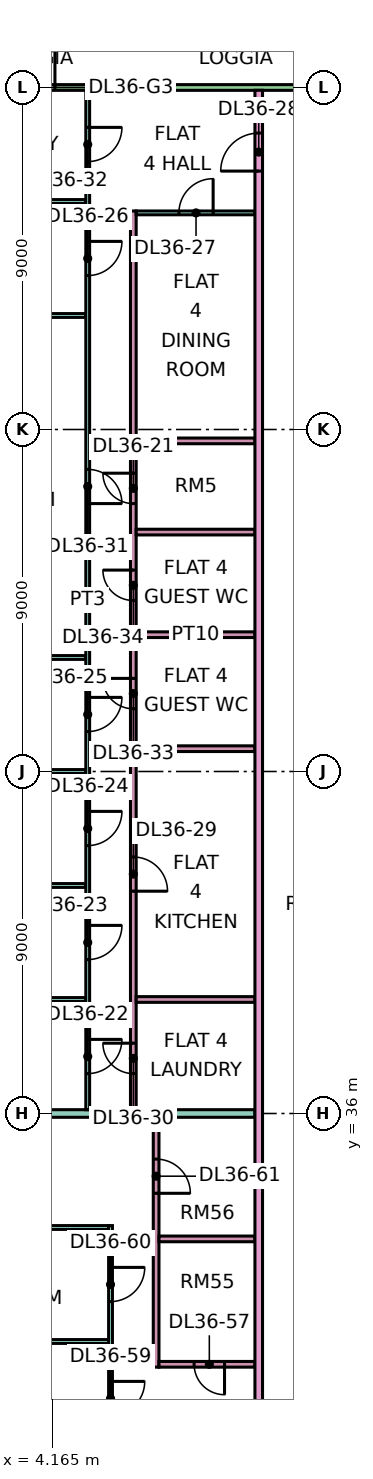
"""IFC4 building model, lengths in metres.
Left out: names, types, materials, properties, quantities, classifications, styles, units other than length and angle.
Written with IfcOpenShell. Run it as: python <this file> out.ifc"""

import sys

from ifc_helpers import new_model, si_unit, direction, frame, frame_2d, origin, place, context, subcontext, project, spatial, rectangle, extrude, element, fill, save


model = new_model("IFC4")
c1 = context("Model", 3, precision=1e-05, world=origin(), true_north=direction((0.0, 1.0)))
c2 = subcontext(c1, "Body", "Model", "MODEL_VIEW")
j1 = project(units=[si_unit("LENGTHUNIT", "METRE"), si_unit("PLANEANGLEUNIT", "RADIAN")], contexts=[c1])
p1 = place(None, origin())
s1 = spatial("IfcSite", under=j1, at=p1, CompositionType="ELEMENT")
p2 = place(p1, origin())
s2 = spatial("IfcBuilding", under=s1, at=p2, CompositionType="ELEMENT")
p3 = place(p2, frame((0.0, 0.0, 161.15)))
s3 = spatial("IfcBuildingStorey", under=s2, at=p3, CompositionType="ELEMENT", Elevation=161.15)
p4 = place(p3, frame((11.925, 63.0, 0.0), z_axis=(0.0, 0.0, 1.0), x_axis=(-1.0, 0.0, 0.0)))
e1 = element("IfcWall", 1, at=p4, inside=s3, PredefinedType="SOLIDWALL", context=c2, shape_type="SweptSolid", body=[
    extrude(rectangle(XDim=10.35, YDim=0.15, at=frame_2d((5.175, 0.0))), origin(), (0.0, 0.0, 1.0), 3.35),
])
p5 = place(p4, frame((7.688, 0.0, 0.0)))
e2 = element("IfcOpeningElement", 2, at=p5, cuts=e1, PredefinedType="OPENING", context=c2, shape_type="SweptSolid", body=[
    extrude(rectangle(XDim=1.8, YDim=2.4, at=frame_2d((0.9, 1.2))), frame((0.0, 0.085, 0.0), z_axis=(0.0, -1.0, 0.0), x_axis=(1.0, 0.0, 0.0)), (0.0, 0.0, 1.0), 0.17),
])
for number, where, z_axis, x_axis in (
    (3, (-1.351, 39.0, 0.0), (0.0, 0.0, 1.0), (1.0, 0.0, 0.0)),
    (4, (-1.351, 42.0, 0.0), (0.0, 0.0, 1.0), (1.0, 0.0, 0.0)),
    (5, (-1.351, 45.0, 0.0), (0.0, 0.0, 1.0), (1.0, 0.0, 0.0)),
):
    element("IfcWall", number, at=place(p3, frame(where, z_axis=z_axis, x_axis=x_axis)), inside=s3, PredefinedType="PARTITIONING", context=c2, shape_type="SweptSolid", body=[
        extrude(rectangle(XDim=6.401, YDim=0.1, at=frame_2d((3.201, 0.0))), origin(), (0.0, 0.0, 1.0), 3.35),
    ])
p6 = place(p3, frame((0.0, 36.0, 0.0), z_axis=(0.0, 0.0, 1.0), x_axis=(1.0, 0.0, 0.0)))
e6 = element("IfcWall", 6, at=p6, inside=s3, PredefinedType="PARTITIONING", context=c2, shape_type="SweptSolid", body=[
    extrude(rectangle(XDim=9.5, YDim=0.2, at=frame_2d((4.75, 0.0))), origin(), (0.0, 0.0, 1.0), 3.35),
])
p7 = place(p3, frame((0.0, 48.0, 0.0), z_axis=(0.0, 0.0, 1.0), x_axis=(1.0, 0.0, 0.0)))
e7 = element("IfcWall", 7, at=p7, inside=s3, PredefinedType="PARTITIONING", context=c2, shape_type="SweptSolid", body=[
    extrude(rectangle(XDim=5.05, YDim=0.1, at=frame_2d((2.525, 0.0))), origin(), (0.0, 0.0, 1.0), 3.35),
])
for number, where, z_axis, x_axis in (
    (8, (0.074, 30.0, 0.0), (0.0, 0.0, 1.0), (1.0, 0.0, 0.0)),
    (9, (0.074, 33.0, 0.0), (0.0, 0.0, 1.0), (1.0, 0.0, 0.0)),
):
    element("IfcWall", number, at=place(p3, frame(where, z_axis=z_axis, x_axis=x_axis)), inside=s3, PredefinedType="PARTITIONING", context=c2, shape_type="SweptSolid", body=[
        extrude(rectangle(XDim=5.576, YDim=0.1, at=frame_2d((2.788, 0.0))), origin(), (0.0, 0.0, 1.0), 3.35),
    ])
for number, where, z_axis, x_axis in (
    (10, (0.074, 57.0, 0.0), (0.0, 0.0, 1.0), (1.0, 0.0, 0.0)),
    (11, (0.074, 60.0, 0.0), (0.0, 0.0, 1.0), (1.0, 0.0, 0.0)),
):
    element("IfcWall", number, at=place(p3, frame(where, z_axis=z_axis, x_axis=x_axis)), inside=s3, PredefinedType="PARTITIONING", context=c2, shape_type="SweptSolid", body=[
        extrude(rectangle(XDim=4.976, YDim=0.1, at=frame_2d((2.488, 0.0))), origin(), (0.0, 0.0, 1.0), 3.35),
    ])
p8 = place(p3, frame((5.1, 36.1, 0.0), z_axis=(0.0, 0.0, 1.0), x_axis=(0.0, 1.0, 0.0)))
e12 = element("IfcWall", 12, at=p8, inside=s3, PredefinedType="PARTITIONING", context=c2, shape_type="SweptSolid", body=[
    extrude(rectangle(XDim=26.826, YDim=0.1, at=frame_2d((13.413, 0.0))), origin(), (0.0, 0.0, 1.0), 3.35),
])
p9 = place(p8, frame((0.95, 0.0, 0.0)))
e13 = element("IfcOpeningElement", 13, at=p9, cuts=e12, PredefinedType="OPENING", context=c2, shape_type="SweptSolid", body=[
    extrude(rectangle(XDim=0.9, YDim=2.1, at=frame_2d((0.45, 1.05))), frame((0.0, 0.06, 0.0), z_axis=(0.0, -1.0, 0.0), x_axis=(1.0, 0.0, 0.0)), (0.0, 0.0, 1.0), 0.12),
])
p10 = place(p8, frame((3.95, 0.0, 0.0)))
e14 = element("IfcOpeningElement", 14, at=p10, cuts=e12, PredefinedType="OPENING", context=c2, shape_type="SweptSolid", body=[
    extrude(rectangle(XDim=0.9, YDim=2.1, at=frame_2d((0.45, 1.05))), frame((0.0, 0.06, 0.0), z_axis=(0.0, -1.0, 0.0), x_axis=(1.0, 0.0, 0.0)), (0.0, 0.0, 1.0), 0.12),
])
p11 = place(p8, frame((6.95, 0.0, 0.0)))
e15 = element("IfcOpeningElement", 15, at=p11, cuts=e12, PredefinedType="OPENING", context=c2, shape_type="SweptSolid", body=[
    extrude(rectangle(XDim=0.9, YDim=2.1, at=frame_2d((0.45, 1.05))), frame((0.0, 0.06, 0.0), z_axis=(0.0, -1.0, 0.0), x_axis=(1.0, 0.0, 0.0)), (0.0, 0.0, 1.0), 0.12),
])
p12 = place(p8, frame((9.95, 0.0, 0.0)))
e16 = element("IfcOpeningElement", 16, at=p12, cuts=e12, PredefinedType="OPENING", context=c2, shape_type="SweptSolid", body=[
    extrude(rectangle(XDim=0.9, YDim=2.1, at=frame_2d((0.45, 1.05))), frame((0.0, 0.06, 0.0), z_axis=(0.0, -1.0, 0.0), x_axis=(1.0, 0.0, 0.0)), (0.0, 0.0, 1.0), 0.12),
])
p13 = place(p8, frame((21.95, 0.0, 0.0)))
e17 = element("IfcOpeningElement", 17, at=p13, cuts=e12, PredefinedType="OPENING", context=c2, shape_type="SweptSolid", body=[
    extrude(rectangle(XDim=0.9, YDim=2.1, at=frame_2d((0.45, 1.05))), frame((0.0, 0.06, 0.0), z_axis=(0.0, -1.0, 0.0), x_axis=(1.0, 0.0, 0.0)), (0.0, 0.0, 1.0), 0.12),
])
p14 = place(p8, frame((15.95, 0.0, 0.0)))
e18 = element("IfcOpeningElement", 18, at=p14, cuts=e12, PredefinedType="OPENING", context=c2, shape_type="SweptSolid", body=[
    extrude(rectangle(XDim=0.9, YDim=2.1, at=frame_2d((0.45, 1.05))), frame((0.0, 0.06, 0.0), z_axis=(0.0, -1.0, 0.0), x_axis=(1.0, 0.0, 0.0)), (0.0, 0.0, 1.0), 0.12),
])
p15 = place(p8, frame((24.95, 0.0, 0.0)))
e19 = element("IfcOpeningElement", 19, at=p15, cuts=e12, PredefinedType="OPENING", context=c2, shape_type="SweptSolid", body=[
    extrude(rectangle(XDim=0.9, YDim=2.1, at=frame_2d((0.45, 1.05))), frame((0.0, 0.06, 0.0), z_axis=(0.0, -1.0, 0.0), x_axis=(1.0, 0.0, 0.0)), (0.0, 0.0, 1.0), 0.12),
])
p16 = place(p3, frame((5.7, 22.5, 0.0), z_axis=(0.0, 0.0, 1.0), x_axis=(0.0, 1.0, 0.0)))
e20 = element("IfcWall", 20, at=p16, inside=s3, PredefinedType="PARTITIONING", context=c2, shape_type="SweptSolid", body=[
    extrude(rectangle(XDim=10.55, YDim=0.1, at=frame_2d((5.275, 0.0))), origin(), (0.0, 0.0, 1.0), 3.35),
])
p17 = place(p16, frame((1.8, 0.0, 0.0)))
e21 = element("IfcOpeningElement", 21, at=p17, cuts=e20, PredefinedType="OPENING", context=c2, shape_type="SweptSolid", body=[
    extrude(rectangle(XDim=0.9, YDim=2.1, at=frame_2d((0.45, 1.05))), frame((0.0, 0.06, 0.0), z_axis=(0.0, -1.0, 0.0), x_axis=(1.0, 0.0, 0.0)), (0.0, 0.0, 1.0), 0.12),
])
p18 = place(p16, frame((5.55, 0.0, 0.0)))
e22 = element("IfcOpeningElement", 22, at=p18, cuts=e20, PredefinedType="OPENING", context=c2, shape_type="SweptSolid", body=[
    extrude(rectangle(XDim=0.9, YDim=2.1, at=frame_2d((0.45, 1.05))), frame((0.0, 0.06, 0.0), z_axis=(0.0, -1.0, 0.0), x_axis=(1.0, 0.0, 0.0)), (0.0, 0.0, 1.0), 0.12),
])
p19 = place(p16, frame((8.55, 0.0, 0.0)))
e23 = element("IfcOpeningElement", 23, at=p19, cuts=e20, PredefinedType="OPENING", context=c2, shape_type="SweptSolid", body=[
    extrude(rectangle(XDim=0.9, YDim=2.1, at=frame_2d((0.45, 1.05))), frame((0.0, 0.06, 0.0), z_axis=(0.0, -1.0, 0.0), x_axis=(1.0, 0.0, 0.0)), (0.0, 0.0, 1.0), 0.12),
])
p20 = place(p3, frame((6.3, 36.1, 0.0), z_axis=(0.0, 0.0, 1.0), x_axis=(0.0, 1.0, 0.0)))
e24 = element("IfcWall", 24, at=p20, inside=s3, PredefinedType="PARTITIONING", context=c2, shape_type="SweptSolid", body=[
    extrude(rectangle(XDim=23.65, YDim=0.15, at=frame_2d((11.825, 0.0))), origin(), (0.0, 0.0, 1.0), 3.35),
])
p21 = place(p20, frame((15.95, 0.0, 0.0)))
e25 = element("IfcOpeningElement", 25, at=p21, cuts=e24, PredefinedType="OPENING", context=c2, shape_type="SweptSolid", body=[
    extrude(rectangle(XDim=0.8, YDim=2.1, at=frame_2d((0.4, 1.05))), frame((0.0, 0.085, 0.0), z_axis=(0.0, -1.0, 0.0), x_axis=(1.0, 0.0, 0.0)), (0.0, 0.0, 1.0), 0.17),
])
p22 = place(p20, frame((5.75, 0.0, 0.0)))
e26 = element("IfcOpeningElement", 26, at=p22, cuts=e24, PredefinedType="OPENING", context=c2, shape_type="SweptSolid", body=[
    extrude(rectangle(XDim=0.9, YDim=2.1, at=frame_2d((0.45, 1.05))), frame((0.0, 0.085, 0.0), z_axis=(0.0, -1.0, 0.0), x_axis=(1.0, 0.0, 0.0)), (0.0, 0.0, 1.0), 0.17),
])
p23 = place(p20, frame((0.95, 0.0, 0.0)))
e27 = element("IfcOpeningElement", 27, at=p23, cuts=e24, PredefinedType="OPENING", context=c2, shape_type="SweptSolid", body=[
    extrude(rectangle(XDim=0.8, YDim=2.1, at=frame_2d((0.4, 1.05))), frame((0.0, 0.085, 0.0), z_axis=(0.0, -1.0, 0.0), x_axis=(1.0, 0.0, 0.0)), (0.0, 0.0, 1.0), 0.17),
])
p24 = place(p20, frame((10.55, 0.0, 0.0)))
e28 = element("IfcOpeningElement", 28, at=p24, cuts=e24, PredefinedType="OPENING", context=c2, shape_type="SweptSolid", body=[
    extrude(rectangle(XDim=0.8, YDim=2.1, at=frame_2d((0.4, 1.05))), frame((0.0, 0.085, 0.0), z_axis=(0.0, -1.0, 0.0), x_axis=(1.0, 0.0, 0.0)), (0.0, 0.0, 1.0), 0.17),
])
p25 = place(p20, frame((13.4, 0.0, 0.0)))
e29 = element("IfcOpeningElement", 29, at=p25, cuts=e24, PredefinedType="OPENING", context=c2, shape_type="SweptSolid", body=[
    extrude(rectangle(XDim=0.8, YDim=2.1, at=frame_2d((0.4, 1.05))), frame((0.0, 0.085, 0.0), z_axis=(0.0, -1.0, 0.0), x_axis=(1.0, 0.0, 0.0)), (0.0, 0.0, 1.0), 0.17),
])
for number, where, z_axis, x_axis in (
    (30, (6.375, 39.0, 0.0), (0.0, 0.0, 1.0), (1.0, 0.0, 0.0)),
    (31, (6.375, 45.6, 0.0), (0.0, 0.0, 1.0), (1.0, 0.0, 0.0)),
    (32, (6.375, 48.6, 0.0), (0.0, 0.0, 1.0), (1.0, 0.0, 0.0)),
    (33, (6.375, 51.3, 0.0), (0.0, 0.0, 1.0), (1.0, 0.0, 0.0)),
    (34, (6.375, 53.7, 0.0), (0.0, 0.0, 1.0), (1.0, 0.0, 0.0)),
):
    element("IfcWall", number, at=place(p3, frame(where, z_axis=z_axis, x_axis=x_axis)), inside=s3, PredefinedType="PARTITIONING", context=c2, shape_type="SweptSolid", body=[
        extrude(rectangle(XDim=3.125, YDim=0.15, at=frame_2d((1.562, 0.0))), origin(), (0.0, 0.0, 1.0), 3.35),
    ])
p26 = place(p3, frame((6.375, 59.7, 0.0), z_axis=(0.0, 0.0, 1.0), x_axis=(1.0, 0.0, 0.0)))
e35 = element("IfcWall", 35, at=p26, inside=s3, PredefinedType="PARTITIONING", context=c2, shape_type="SweptSolid", body=[
    extrude(rectangle(XDim=3.125, YDim=0.1, at=frame_2d((1.562, 0.0))), origin(), (0.0, 0.0, 1.0), 3.35),
])
p27 = place(p26, frame((1.125, 0.0, 0.0)))
e36 = element("IfcOpeningElement", 36, at=p27, cuts=e35, PredefinedType="OPENING", context=c2, shape_type="SweptSolid", body=[
    extrude(rectangle(XDim=0.9, YDim=2.1, at=frame_2d((0.45, 1.05))), frame((0.0, 0.06, 0.0), z_axis=(0.0, -1.0, 0.0), x_axis=(1.0, 0.0, 0.0)), (0.0, 0.0, 1.0), 0.12),
])
p28 = place(p3, frame((6.9, 29.325, 0.0), z_axis=(0.0, 0.0, 1.0), x_axis=(0.0, 1.0, 0.0)))
e37 = element("IfcWall", 37, at=p28, inside=s3, PredefinedType="PARTITIONING", context=c2, shape_type="SweptSolid", body=[
    extrude(rectangle(XDim=6.575, YDim=0.15, at=frame_2d((3.288, 0.0))), origin(), (0.0, 0.0, 1.0), 3.35),
])
p29 = place(p28, frame((4.575, 0.0, 0.0)))
e38 = element("IfcOpeningElement", 38, at=p29, cuts=e37, PredefinedType="OPENING", context=c2, shape_type="SweptSolid", body=[
    extrude(rectangle(XDim=0.9, YDim=2.1, at=frame_2d((0.45, 1.05))), frame((0.0, 0.085, 0.0), z_axis=(0.0, -1.0, 0.0), x_axis=(1.0, 0.0, 0.0)), (0.0, 0.0, 1.0), 0.17),
])
p30 = place(p3, frame((6.975, 29.4, 0.0), z_axis=(0.0, 0.0, 1.0), x_axis=(1.0, 0.0, 0.0)))
e39 = element("IfcWall", 39, at=p30, inside=s3, PredefinedType="PARTITIONING", context=c2, shape_type="SweptSolid", body=[
    extrude(rectangle(XDim=2.525, YDim=0.15, at=frame_2d((1.262, 0.0))), origin(), (0.0, 0.0, 1.0), 3.35),
])
p31 = place(p30, frame((0.925, 0.0, 0.0)))
e40 = element("IfcOpeningElement", 40, at=p31, cuts=e39, PredefinedType="OPENING", context=c2, shape_type="SweptSolid", body=[
    extrude(rectangle(XDim=0.8, YDim=2.1, at=frame_2d((0.4, 1.05))), frame((0.0, 0.085, 0.0), z_axis=(0.0, -1.0, 0.0), x_axis=(1.0, 0.0, 0.0)), (0.0, 0.0, 1.0), 0.17),
])
p32 = place(p3, frame((6.975, 32.7, 0.0), z_axis=(0.0, 0.0, 1.0), x_axis=(1.0, 0.0, 0.0)))
e41 = element("IfcWall", 41, at=p32, inside=s3, PredefinedType="PARTITIONING", context=c2, shape_type="SweptSolid", body=[
    extrude(rectangle(XDim=2.525, YDim=0.15, at=frame_2d((1.262, 0.0))), origin(), (0.0, 0.0, 1.0), 3.35),
])
p33 = place(p3, frame((9.6, 20.0, 0.0), z_axis=(0.0, 0.0, 1.0), x_axis=(0.0, 1.0, 0.0)))
e42 = element("IfcWall", 42, at=p33, inside=s3, PredefinedType="PARTITIONING", context=c2, shape_type="SweptSolid", body=[
    extrude(rectangle(XDim=42.926, YDim=0.2, at=frame_2d((21.463, 0.0))), origin(), (0.0, 0.0, 1.0), 3.35),
])
p34 = place(p33, frame((40.8, 0.0, 0.0)))
e43 = element("IfcOpeningElement", 43, at=p34, cuts=e42, PredefinedType="OPENING", context=c2, shape_type="SweptSolid", body=[
    extrude(rectangle(XDim=1.0, YDim=2.1, at=frame_2d((0.5, 1.05))), frame((0.0, 0.11, 0.0), z_axis=(0.0, -1.0, 0.0), x_axis=(1.0, 0.0, 0.0)), (0.0, 0.0, 1.0), 0.22),
])
p35 = place(p33, frame((0.6, 0.0, 0.0)))
e44 = element("IfcOpeningElement", 44, at=p35, cuts=e42, PredefinedType="OPENING", context=c2, shape_type="SweptSolid", body=[
    extrude(rectangle(XDim=1.2, YDim=2.1, at=frame_2d((0.6, 1.05))), frame((0.0, 0.11, 0.0), z_axis=(0.0, -1.0, 0.0), x_axis=(1.0, 0.0, 0.0)), (0.0, 0.0, 1.0), 0.22),
])
p36 = place(p33, frame((3.9, 0.0, 0.0)))
e45 = element("IfcOpeningElement", 45, at=p36, cuts=e42, PredefinedType="OPENING", context=c2, shape_type="SweptSolid", body=[
    extrude(rectangle(XDim=1.0, YDim=2.1, at=frame_2d((0.5, 1.05))), frame((0.0, 0.11, 0.0), z_axis=(0.0, -1.0, 0.0), x_axis=(1.0, 0.0, 0.0)), (0.0, 0.0, 1.0), 0.22),
])
p37 = place(p5, frame((1.8, 0.0, 0.0), z_axis=(0.0, 0.0, 1.0), x_axis=(-1.0, 0.0, 0.0)))
e46 = element("IfcDoor", 46, at=p37, inside=s3, OperationType="DOUBLE_DOOR_SINGLE_SWING", PredefinedType="DOOR", context=c2, shape_type="SweptSolid", body=[
    extrude(rectangle(XDim=1.8, YDim=2.4, at=frame_2d((0.9, 1.2))), frame((0.0, 0.025, 0.0), z_axis=(0.0, -1.0, 0.0), x_axis=(1.0, 0.0, 0.0)), (0.0, 0.0, 1.0), 0.05),
])
fill(e2, e46)
p38 = place(p21, frame((0.8, 0.0, 0.0), z_axis=(0.0, 0.0, 1.0), x_axis=(-1.0, 0.0, 0.0)))
e47 = element("IfcDoor", 47, at=p38, inside=s3, OperationType="SINGLE_SWING_RIGHT", PredefinedType="DOOR", context=c2, shape_type="SweptSolid", body=[
    extrude(rectangle(XDim=0.8, YDim=2.1, at=frame_2d((0.4, 1.05))), frame((0.0, 0.025, 0.0), z_axis=(0.0, -1.0, 0.0), x_axis=(1.0, 0.0, 0.0)), (0.0, 0.0, 1.0), 0.05),
])
fill(e25, e47)
p39 = place(p9, origin())
e48 = element("IfcDoor", 48, at=p39, inside=s3, OperationType="SINGLE_SWING_RIGHT", PredefinedType="DOOR", context=c2, shape_type="SweptSolid", body=[
    extrude(rectangle(XDim=0.9, YDim=2.1, at=frame_2d((0.45, 1.05))), frame((0.0, 0.025, 0.0), z_axis=(0.0, -1.0, 0.0), x_axis=(1.0, 0.0, 0.0)), (0.0, 0.0, 1.0), 0.05),
])
fill(e13, e48)
p40 = place(p10, origin())
e49 = element("IfcDoor", 49, at=p40, inside=s3, OperationType="SINGLE_SWING_RIGHT", PredefinedType="DOOR", context=c2, shape_type="SweptSolid", body=[
    extrude(rectangle(XDim=0.9, YDim=2.1, at=frame_2d((0.45, 1.05))), frame((0.0, 0.025, 0.0), z_axis=(0.0, -1.0, 0.0), x_axis=(1.0, 0.0, 0.0)), (0.0, 0.0, 1.0), 0.05),
])
fill(e14, e49)
p41 = place(p11, origin())
e50 = element("IfcDoor", 50, at=p41, inside=s3, OperationType="SINGLE_SWING_RIGHT", PredefinedType="DOOR", context=c2, shape_type="SweptSolid", body=[
    extrude(rectangle(XDim=0.9, YDim=2.1, at=frame_2d((0.45, 1.05))), frame((0.0, 0.025, 0.0), z_axis=(0.0, -1.0, 0.0), x_axis=(1.0, 0.0, 0.0)), (0.0, 0.0, 1.0), 0.05),
])
fill(e15, e50)
p42 = place(p12, origin())
e51 = element("IfcDoor", 51, at=p42, inside=s3, OperationType="SINGLE_SWING_RIGHT", PredefinedType="DOOR", context=c2, shape_type="SweptSolid", body=[
    extrude(rectangle(XDim=0.9, YDim=2.1, at=frame_2d((0.45, 1.05))), frame((0.0, 0.025, 0.0), z_axis=(0.0, -1.0, 0.0), x_axis=(1.0, 0.0, 0.0)), (0.0, 0.0, 1.0), 0.05),
])
fill(e16, e51)
p43 = place(p13, origin())
e52 = element("IfcDoor", 52, at=p43, inside=s3, OperationType="SINGLE_SWING_RIGHT", PredefinedType="DOOR", context=c2, shape_type="SweptSolid", body=[
    extrude(rectangle(XDim=0.9, YDim=2.1, at=frame_2d((0.45, 1.05))), frame((0.0, 0.025, 0.0), z_axis=(0.0, -1.0, 0.0), x_axis=(1.0, 0.0, 0.0)), (0.0, 0.0, 1.0), 0.05),
])
fill(e17, e52)
p44 = place(p27, frame((0.9, 0.0, 0.0), z_axis=(0.0, 0.0, 1.0), x_axis=(-1.0, 0.0, 0.0)))
e53 = element("IfcDoor", 53, at=p44, inside=s3, OperationType="SINGLE_SWING_RIGHT", PredefinedType="DOOR", context=c2, shape_type="SweptSolid", body=[
    extrude(rectangle(XDim=0.9, YDim=2.1, at=frame_2d((0.45, 1.05))), frame((0.0, 0.025, 0.0), z_axis=(0.0, -1.0, 0.0), x_axis=(1.0, 0.0, 0.0)), (0.0, 0.0, 1.0), 0.05),
])
fill(e36, e53)
p45 = place(p34, origin())
e54 = element("IfcDoor", 54, at=p45, inside=s3, OperationType="SINGLE_SWING_LEFT", PredefinedType="DOOR", context=c2, shape_type="SweptSolid", body=[
    extrude(rectangle(XDim=1.0, YDim=2.1, at=frame_2d((0.5, 1.05))), frame((0.0, 0.025, 0.0), z_axis=(0.0, -1.0, 0.0), x_axis=(1.0, 0.0, 0.0)), (0.0, 0.0, 1.0), 0.05),
])
fill(e43, e54)
p46 = place(p22, frame((0.9, 0.0, 0.0), z_axis=(0.0, 0.0, 1.0), x_axis=(-1.0, 0.0, 0.0)))
e55 = element("IfcDoor", 55, at=p46, inside=s3, OperationType="SINGLE_SWING_LEFT", PredefinedType="DOOR", context=c2, shape_type="SweptSolid", body=[
    extrude(rectangle(XDim=0.9, YDim=2.1, at=frame_2d((0.45, 1.05))), frame((0.0, 0.025, 0.0), z_axis=(0.0, -1.0, 0.0), x_axis=(1.0, 0.0, 0.0)), (0.0, 0.0, 1.0), 0.05),
])
fill(e26, e55)
p47 = place(p23, frame((0.8, 0.0, 0.0), z_axis=(0.0, 0.0, 1.0), x_axis=(-1.0, 0.0, 0.0)))
e56 = element("IfcDoor", 56, at=p47, inside=s3, OperationType="SINGLE_SWING_RIGHT", PredefinedType="DOOR", context=c2, shape_type="SweptSolid", body=[
    extrude(rectangle(XDim=0.8, YDim=2.1, at=frame_2d((0.4, 1.05))), frame((0.0, 0.025, 0.0), z_axis=(0.0, -1.0, 0.0), x_axis=(1.0, 0.0, 0.0)), (0.0, 0.0, 1.0), 0.05),
])
fill(e27, e56)
p48 = place(p14, frame((0.9, 0.0, 0.0), z_axis=(0.0, 0.0, 1.0), x_axis=(-1.0, 0.0, 0.0)))
e57 = element("IfcDoor", 57, at=p48, inside=s3, OperationType="SINGLE_SWING_LEFT", PredefinedType="DOOR", context=c2, shape_type="SweptSolid", body=[
    extrude(rectangle(XDim=0.9, YDim=2.1, at=frame_2d((0.45, 1.05))), frame((0.0, 0.025, 0.0), z_axis=(0.0, -1.0, 0.0), x_axis=(1.0, 0.0, 0.0)), (0.0, 0.0, 1.0), 0.05),
])
fill(e18, e57)
p49 = place(p15, origin())
e58 = element("IfcDoor", 58, at=p49, inside=s3, OperationType="SINGLE_SWING_RIGHT", PredefinedType="DOOR", context=c2, shape_type="SweptSolid", body=[
    extrude(rectangle(XDim=0.9, YDim=2.1, at=frame_2d((0.45, 1.05))), frame((0.0, 0.025, 0.0), z_axis=(0.0, -1.0, 0.0), x_axis=(1.0, 0.0, 0.0)), (0.0, 0.0, 1.0), 0.05),
])
fill(e19, e58)
p50 = place(p24, frame((0.8, 0.0, 0.0), z_axis=(0.0, 0.0, 1.0), x_axis=(-1.0, 0.0, 0.0)))
e59 = element("IfcDoor", 59, at=p50, inside=s3, OperationType="SINGLE_SWING_RIGHT", PredefinedType="DOOR", context=c2, shape_type="SweptSolid", body=[
    extrude(rectangle(XDim=0.8, YDim=2.1, at=frame_2d((0.4, 1.05))), frame((0.0, 0.025, 0.0), z_axis=(0.0, -1.0, 0.0), x_axis=(1.0, 0.0, 0.0)), (0.0, 0.0, 1.0), 0.05),
])
fill(e28, e59)
p51 = place(p25, frame((0.8, 0.0, 0.0), z_axis=(0.0, 0.0, 1.0), x_axis=(-1.0, 0.0, 0.0)))
e60 = element("IfcDoor", 60, at=p51, inside=s3, OperationType="SINGLE_SWING_RIGHT", PredefinedType="DOOR", context=c2, shape_type="SweptSolid", body=[
    extrude(rectangle(XDim=0.8, YDim=2.1, at=frame_2d((0.4, 1.05))), frame((0.0, 0.025, 0.0), z_axis=(0.0, -1.0, 0.0), x_axis=(1.0, 0.0, 0.0)), (0.0, 0.0, 1.0), 0.05),
])
fill(e29, e60)
p52 = place(p31, origin())
e61 = element("IfcDoor", 61, at=p52, inside=s3, OperationType="SINGLE_SWING_RIGHT", PredefinedType="DOOR", context=c2, shape_type="SweptSolid", body=[
    extrude(rectangle(XDim=0.8, YDim=2.1, at=frame_2d((0.4, 1.05))), frame((0.0, 0.025, 0.0), z_axis=(0.0, -1.0, 0.0), x_axis=(1.0, 0.0, 0.0)), (0.0, 0.0, 1.0), 0.05),
])
fill(e40, e61)
p53 = place(p18, origin())
e62 = element("IfcDoor", 62, at=p53, inside=s3, OperationType="SINGLE_SWING_RIGHT", PredefinedType="DOOR", context=c2, shape_type="SweptSolid", body=[
    extrude(rectangle(XDim=0.9, YDim=2.1, at=frame_2d((0.45, 1.05))), frame((0.0, 0.025, 0.0), z_axis=(0.0, -1.0, 0.0), x_axis=(1.0, 0.0, 0.0)), (0.0, 0.0, 1.0), 0.05),
])
fill(e22, e62)
p54 = place(p19, origin())
e63 = element("IfcDoor", 63, at=p54, inside=s3, OperationType="SINGLE_SWING_RIGHT", PredefinedType="DOOR", context=c2, shape_type="SweptSolid", body=[
    extrude(rectangle(XDim=0.9, YDim=2.1, at=frame_2d((0.45, 1.05))), frame((0.0, 0.025, 0.0), z_axis=(0.0, -1.0, 0.0), x_axis=(1.0, 0.0, 0.0)), (0.0, 0.0, 1.0), 0.05),
])
fill(e23, e63)
p55 = place(p29, frame((0.9, 0.0, 0.0), z_axis=(0.0, 0.0, 1.0), x_axis=(-1.0, 0.0, 0.0)))
e64 = element("IfcDoor", 64, at=p55, inside=s3, OperationType="SINGLE_SWING_LEFT", PredefinedType="DOOR", context=c2, shape_type="SweptSolid", body=[
    extrude(rectangle(XDim=0.9, YDim=2.1, at=frame_2d((0.45, 1.05))), frame((0.0, 0.025, 0.0), z_axis=(0.0, -1.0, 0.0), x_axis=(1.0, 0.0, 0.0)), (0.0, 0.0, 1.0), 0.05),
])
fill(e38, e64)
save(model, sys.argv[1])
